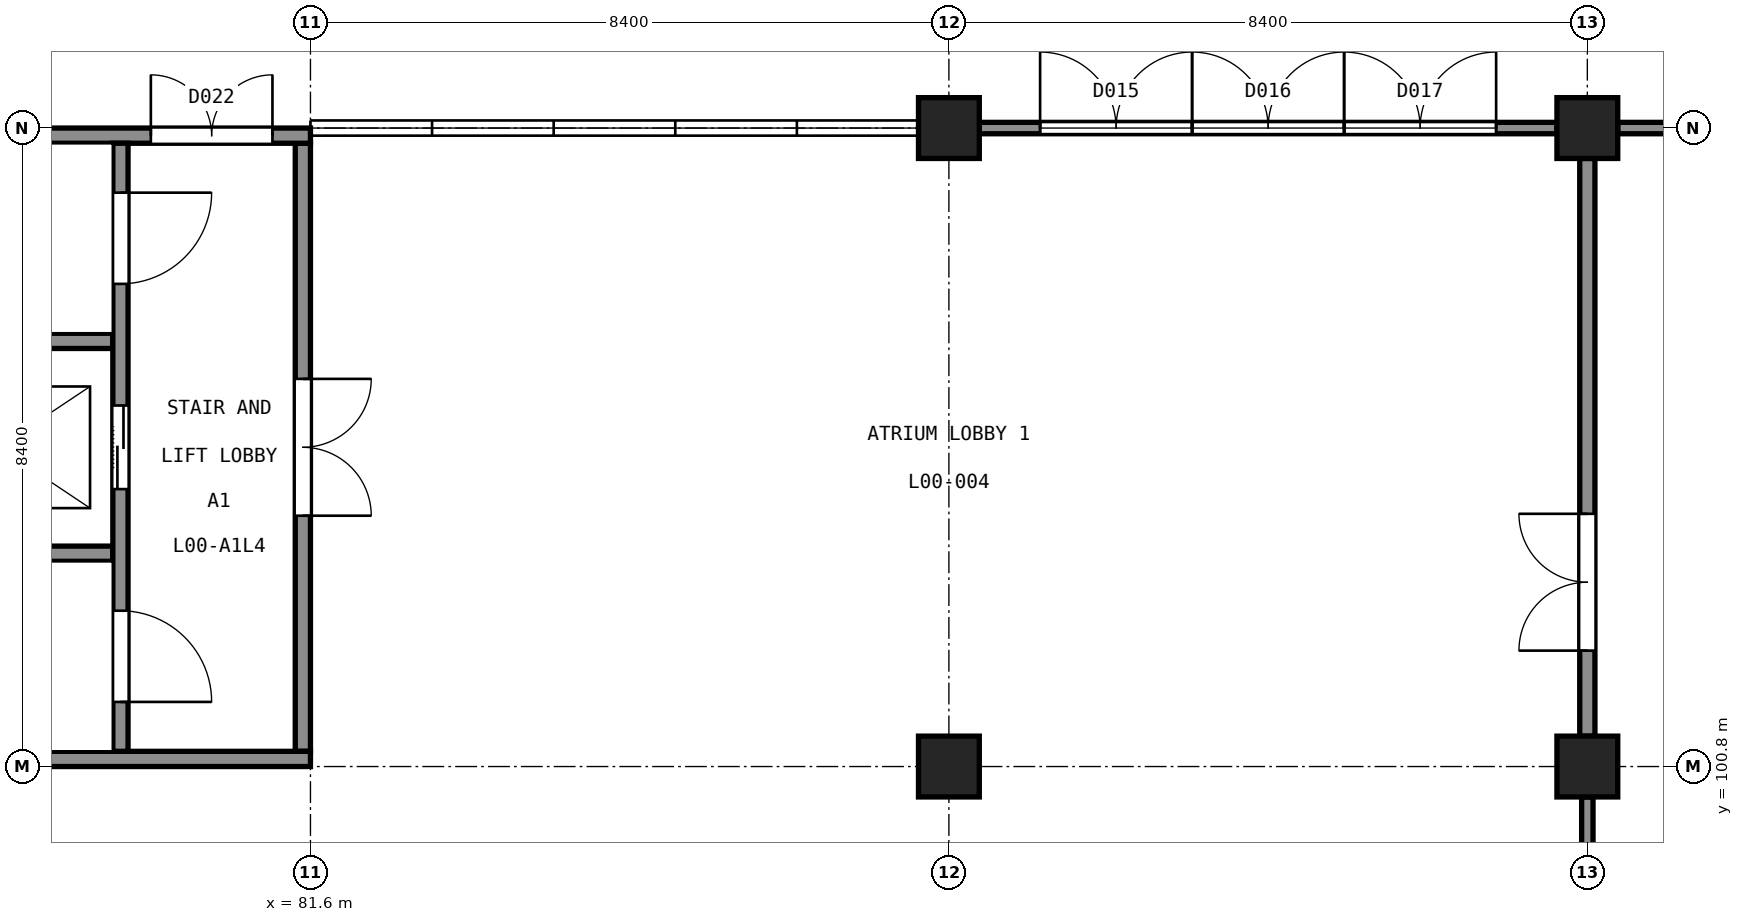
"""IFC4 building model, lengths in metres.
Left out: names, types, materials, properties, quantities, classifications, styles, units other than length and angle.
Written with IfcOpenShell. Run it as: python <this file> out.ifc"""

import sys

from ifc_helpers import new_model, si_unit, direction, frame, frame_2d, origin, origin_2d, place, context, subcontext, project, spatial, rectangle, extrude, element, fill, save


model = new_model("IFC4")
c1 = context("Model", 3, precision=1e-05, world=origin(), true_north=direction((0.0, 1.0)))
c2 = subcontext(c1, "Body", "Model", "MODEL_VIEW")
j1 = project(units=[si_unit("LENGTHUNIT", "METRE"), si_unit("PLANEANGLEUNIT", "RADIAN")], contexts=[c1])
p1 = place(None, origin())
s1 = spatial("IfcSite", under=j1, at=p1, CompositionType="ELEMENT")
p2 = place(p1, origin())
s2 = spatial("IfcBuilding", under=s1, at=p2, CompositionType="ELEMENT")
p3 = place(p2, origin())
s3 = spatial("IfcBuildingStorey", under=s2, at=p3, CompositionType="ELEMENT", Elevation=0.0)
p4 = place(p3, frame((73.2, 100.9, -1.8), z_axis=(0.0, 0.0, 1.0), x_axis=(1.0, 0.0, 0.0)))
e1 = element("IfcWall", 1, at=p4, inside=s3, PredefinedType="SHEAR", context=c2, shape_type="SweptSolid", body=[
    extrude(rectangle(XDim=8.4, YDim=0.2, at=frame_2d((4.2, 0.0))), origin(), (0.0, 0.0, 1.0), 7.3),
])
p5 = place(p3, frame((73.2, 109.1, -1.8), z_axis=(0.0, 0.0, 1.0), x_axis=(1.0, 0.0, 0.0)))
e2 = element("IfcWall", 2, at=p5, inside=s3, PredefinedType="SHEAR", context=c2, shape_type="SweptSolid", body=[
    extrude(rectangle(XDim=8.4, YDim=0.2, at=frame_2d((4.2, 0.0))), origin(), (0.0, 0.0, 1.0), 7.3),
])
p6 = place(p5, frame((6.3, 0.0, 1.8)))
e3 = element("IfcOpeningElement", 3, at=p6, cuts=e2, PredefinedType="OPENING", context=c2, shape_type="SweptSolid", body=[
    extrude(rectangle(XDim=1.6, YDim=2.1, at=frame_2d((0.8, 1.05))), frame((0.0, 0.11, 0.0), z_axis=(0.0, -1.0, 0.0), x_axis=(1.0, 0.0, 0.0)), (0.0, 0.0, 1.0), 0.22),
])
p7 = place(p3, frame((81.5, 101.0, -1.8), z_axis=(0.0, 0.0, 1.0), x_axis=(0.0, 1.0, 0.0)))
e4 = element("IfcWall", 4, at=p7, inside=s3, PredefinedType="SHEAR", context=c2, shape_type="SweptSolid", body=[
    extrude(rectangle(XDim=8.0, YDim=0.2, at=frame_2d((4.0, 0.0))), origin(), (0.0, 0.0, 1.0), 7.3),
])
p8 = place(p7, frame((3.1, 0.0, 1.8)))
e5 = element("IfcOpeningElement", 5, at=p8, cuts=e4, PredefinedType="OPENING", context=c2, shape_type="SweptSolid", body=[
    extrude(rectangle(XDim=1.8, YDim=2.1, at=frame_2d((0.9, 1.05))), frame((0.0, 0.11, 0.0), z_axis=(0.0, -1.0, 0.0), x_axis=(1.0, 0.0, 0.0)), (0.0, 0.0, 1.0), 0.22),
])
p9 = place(p3, frame((79.1, 101.0, -1.8), z_axis=(0.0, 0.0, 1.0), x_axis=(0.0, 1.0, 0.0)))
e6 = element("IfcWall", 6, at=p9, inside=s3, PredefinedType="SHEAR", context=c2, shape_type="SweptSolid", body=[
    extrude(rectangle(XDim=8.0, YDim=0.2, at=frame_2d((4.0, 0.0))), origin(), (0.0, 0.0, 1.0), 7.3),
])
p10 = place(p9, frame((0.65, 0.0, 1.8)))
e7 = element("IfcOpeningElement", 7, at=p10, cuts=e6, PredefinedType="OPENING", context=c2, shape_type="SweptSolid", body=[
    extrude(rectangle(XDim=1.2, YDim=2.1, at=frame_2d((0.6, 1.05))), frame((0.0, 0.11, 0.0), z_axis=(0.0, -1.0, 0.0), x_axis=(1.0, 0.0, 0.0)), (0.0, 0.0, 1.0), 0.22),
])
p11 = place(p9, frame((6.15, 0.0, 1.8)))
e8 = element("IfcOpeningElement", 8, at=p11, cuts=e6, PredefinedType="OPENING", context=c2, shape_type="SweptSolid", body=[
    extrude(rectangle(XDim=1.2, YDim=2.1, at=frame_2d((0.6, 1.05))), frame((0.0, 0.11, 0.0), z_axis=(0.0, -1.0, 0.0), x_axis=(1.0, 0.0, 0.0)), (0.0, 0.0, 1.0), 0.22),
])
p12 = place(p9, frame((3.45, 0.0, 1.8)))
e9 = element("IfcOpeningElement", 9, at=p12, cuts=e6, PredefinedType="OPENING", context=c2, shape_type="SweptSolid", body=[
    extrude(rectangle(XDim=1.1, YDim=2.1, at=frame_2d((0.55, 1.05))), frame((0.0, 0.11, 0.0), z_axis=(0.0, -1.0, 0.0), x_axis=(1.0, 0.0, 0.0)), (0.0, 0.0, 1.0), 0.22),
])
for number, where, z_axis, x_axis in (
    (10, (73.4, 103.6, -1.8), (0.0, 0.0, 1.0), (1.0, 0.0, 0.0)),
    (11, (73.4, 106.4, -1.8), (0.0, 0.0, 1.0), (1.0, 0.0, 0.0)),
):
    element("IfcWall", number, at=place(p3, frame(where, z_axis=z_axis, x_axis=x_axis)), inside=s3, PredefinedType="SHEAR", context=c2, shape_type="SweptSolid", body=[
        extrude(rectangle(XDim=5.6, YDim=0.2, at=frame_2d((2.8, 0.0))), origin(), (0.0, 0.0, 1.0), 7.3),
    ])
for number, where, z_axis, x_axis in (
    (12, (90.0, 100.8, -0.3), (0.0, 0.0, 1.0), (1.0, 0.0, 0.0)),
    (13, (90.0, 109.2, -0.3), (0.0, 0.0, 1.0), (1.0, 0.0, 0.0)),
    (14, (98.4, 100.8, -0.3), (0.0, 0.0, 1.0), (1.0, 0.0, 0.0)),
    (15, (98.4, 109.2, -0.3), (0.0, 0.0, 1.0), (1.0, 0.0, 0.0)),
):
    element("IfcColumn", number, at=place(p3, frame(where, z_axis=z_axis, x_axis=x_axis)), inside=s3, PredefinedType="COLUMN", context=c2, shape_type="SweptSolid", body=[
        extrude(rectangle(XDim=0.8, YDim=0.8, at=origin_2d()), origin(), (0.0, 0.0, 1.0), 5.8),
    ])
p13 = place(p3, frame((98.8, 109.2, 0.0), z_axis=(0.0, 0.0, 1.0), x_axis=(1.0, 0.0, 0.0)))
e16 = element("IfcWall", 16, at=p13, inside=s3, PredefinedType="ELEMENTEDWALL", context=c2, shape_type="SweptSolid", body=[
    extrude(rectangle(XDim=7.6, YDim=0.15, at=frame_2d((3.8, 0.0))), origin(), (0.0, 0.0, 1.0), 4.44),
])
p14 = place(p13, frame((2.0, 0.0, 0.0)))
e17 = element("IfcOpeningElement", 17, at=p14, cuts=e16, PredefinedType="OPENING", context=c2, shape_type="SweptSolid", body=[
    extrude(rectangle(XDim=1.8, YDim=2.4, at=frame_2d((0.9, 1.2))), frame((0.0, 0.085, 0.0), z_axis=(0.0, -1.0, 0.0), x_axis=(1.0, 0.0, 0.0)), (0.0, 0.0, 1.0), 0.17),
])
p15 = place(p13, frame((2.0, 0.0, 2.6)))
e18 = element("IfcOpeningElement", 18, at=p15, cuts=e16, PredefinedType="OPENING", context=c2, shape_type="SweptSolid", body=[
    extrude(rectangle(XDim=1.8, YDim=1.74, at=frame_2d((0.9, 0.87))), frame((0.0, 0.085, 0.0), z_axis=(0.0, -1.0, 0.0), x_axis=(1.0, 0.0, 0.0)), (0.0, 0.0, 1.0), 0.17),
])
p16 = place(p13, frame((3.8, 0.0, 0.0)))
e19 = element("IfcOpeningElement", 19, at=p16, cuts=e16, PredefinedType="OPENING", context=c2, shape_type="SweptSolid", body=[
    extrude(rectangle(XDim=1.8, YDim=2.4, at=frame_2d((0.9, 1.2))), frame((0.0, 0.085, 0.0), z_axis=(0.0, -1.0, 0.0), x_axis=(1.0, 0.0, 0.0)), (0.0, 0.0, 1.0), 0.17),
])
p17 = place(p13, frame((3.8, 0.0, 2.6)))
e20 = element("IfcOpeningElement", 20, at=p17, cuts=e16, PredefinedType="OPENING", context=c2, shape_type="SweptSolid", body=[
    extrude(rectangle(XDim=1.8, YDim=1.74, at=frame_2d((0.9, 0.87))), frame((0.0, 0.085, 0.0), z_axis=(0.0, -1.0, 0.0), x_axis=(1.0, 0.0, 0.0)), (0.0, 0.0, 1.0), 0.17),
])
p18 = place(p3, frame((90.4, 109.2, 0.0), z_axis=(0.0, 0.0, 1.0), x_axis=(1.0, 0.0, 0.0)))
e21 = element("IfcWall", 21, at=p18, inside=s3, PredefinedType="ELEMENTEDWALL", context=c2, shape_type="SweptSolid", body=[
    extrude(rectangle(XDim=7.6, YDim=0.15, at=frame_2d((3.8, 0.0))), origin(), (0.0, 0.0, 1.0), 4.44),
])
p19 = place(p18, frame((0.8, 0.0, 0.0)))
e22 = element("IfcOpeningElement", 22, at=p19, cuts=e21, PredefinedType="OPENING", context=c2, shape_type="SweptSolid", body=[
    extrude(rectangle(XDim=2.0, YDim=2.4, at=frame_2d((1.0, 1.2))), frame((0.0, 0.085, 0.0), z_axis=(0.0, -1.0, 0.0), x_axis=(1.0, 0.0, 0.0)), (0.0, 0.0, 1.0), 0.17),
])
p20 = place(p18, frame((0.8, 0.0, 2.6)))
e23 = element("IfcOpeningElement", 23, at=p20, cuts=e21, PredefinedType="OPENING", context=c2, shape_type="SweptSolid", body=[
    extrude(rectangle(XDim=2.0, YDim=1.74, at=frame_2d((1.0, 0.87))), frame((0.0, 0.085, 0.0), z_axis=(0.0, -1.0, 0.0), x_axis=(1.0, 0.0, 0.0)), (0.0, 0.0, 1.0), 0.17),
])
p21 = place(p18, frame((2.8, 0.0, 0.0)))
e24 = element("IfcOpeningElement", 24, at=p21, cuts=e21, PredefinedType="OPENING", context=c2, shape_type="SweptSolid", body=[
    extrude(rectangle(XDim=2.0, YDim=2.4, at=frame_2d((1.0, 1.2))), frame((0.0, 0.085, 0.0), z_axis=(0.0, -1.0, 0.0), x_axis=(1.0, 0.0, 0.0)), (0.0, 0.0, 1.0), 0.17),
])
p22 = place(p18, frame((2.8, 0.0, 2.6)))
e25 = element("IfcOpeningElement", 25, at=p22, cuts=e21, PredefinedType="OPENING", context=c2, shape_type="SweptSolid", body=[
    extrude(rectangle(XDim=2.0, YDim=1.74, at=frame_2d((1.0, 0.87))), frame((0.0, 0.085, 0.0), z_axis=(0.0, -1.0, 0.0), x_axis=(1.0, 0.0, 0.0)), (0.0, 0.0, 1.0), 0.17),
])
p23 = place(p18, frame((4.8, 0.0, 0.0)))
e26 = element("IfcOpeningElement", 26, at=p23, cuts=e21, PredefinedType="OPENING", context=c2, shape_type="SweptSolid", body=[
    extrude(rectangle(XDim=2.0, YDim=2.4, at=frame_2d((1.0, 1.2))), frame((0.0, 0.085, 0.0), z_axis=(0.0, -1.0, 0.0), x_axis=(1.0, 0.0, 0.0)), (0.0, 0.0, 1.0), 0.17),
])
p24 = place(p18, frame((4.8, 0.0, 2.6)))
e27 = element("IfcOpeningElement", 27, at=p24, cuts=e21, PredefinedType="OPENING", context=c2, shape_type="SweptSolid", body=[
    extrude(rectangle(XDim=2.0, YDim=1.74, at=frame_2d((1.0, 0.87))), frame((0.0, 0.085, 0.0), z_axis=(0.0, -1.0, 0.0), x_axis=(1.0, 0.0, 0.0)), (0.0, 0.0, 1.0), 0.17),
])
p25 = place(p3, frame((98.4, 101.2, 0.0), z_axis=(0.0, 0.0, 1.0), x_axis=(0.0, 1.0, 0.0)))
e28 = element("IfcWall", 28, at=p25, inside=s3, PredefinedType="PARTITIONING", context=c2, shape_type="SweptSolid", body=[
    extrude(rectangle(XDim=7.6, YDim=0.2, at=frame_2d((3.8, 0.0))), origin(), (0.0, 0.0, 1.0), 4.4),
])
p26 = place(p25, frame((1.125, 0.0, 0.0)))
e29 = element("IfcOpeningElement", 29, at=p26, cuts=e28, PredefinedType="OPENING", context=c2, shape_type="SweptSolid", body=[
    extrude(rectangle(XDim=1.8, YDim=2.1, at=frame_2d((0.9, 1.05))), frame((0.0, 0.11, 0.0), z_axis=(0.0, -1.0, 0.0), x_axis=(1.0, 0.0, 0.0)), (0.0, 0.0, 1.0), 0.22),
])
p27 = place(p3, frame((98.4, 92.8, 0.0), z_axis=(0.0, 0.0, 1.0), x_axis=(0.0, 1.0, 0.0)))
e30 = element("IfcWall", 30, at=p27, inside=s3, PredefinedType="PARTITIONING", context=c2, shape_type="SweptSolid", body=[
    extrude(rectangle(XDim=7.6, YDim=0.15, at=frame_2d((3.8, 0.0))), origin(), (0.0, 0.0, 1.0), 4.4),
])
p28 = place(p19, origin())
e31 = element("IfcDoor", 31, at=p28, inside=s3, OperationType="DOUBLE_DOOR_SINGLE_SWING", PredefinedType="DOOR", context=c2, shape_type="SweptSolid", body=[
    extrude(rectangle(XDim=2.0, YDim=2.4, at=frame_2d((1.0, 1.2))), frame((0.0, 0.025, 0.0), z_axis=(0.0, -1.0, 0.0), x_axis=(1.0, 0.0, 0.0)), (0.0, 0.0, 1.0), 0.05),
])
fill(e22, e31)
p29 = place(p20, origin())
e32 = element("IfcWindow", 32, at=p29, inside=s3, PartitioningType="SINGLE_PANEL", PredefinedType="WINDOW", context=c2, shape_type="SweptSolid", body=[
    extrude(rectangle(XDim=2.0, YDim=1.74, at=frame_2d((1.0, 0.87))), frame((0.0, 0.03, 0.0), z_axis=(0.0, -1.0, 0.0), x_axis=(1.0, 0.0, 0.0)), (0.0, 0.0, 1.0), 0.06),
])
fill(e23, e32)
p30 = place(p21, origin())
e33 = element("IfcDoor", 33, at=p30, inside=s3, OperationType="DOUBLE_DOOR_SINGLE_SWING", PredefinedType="DOOR", context=c2, shape_type="SweptSolid", body=[
    extrude(rectangle(XDim=2.0, YDim=2.4, at=frame_2d((1.0, 1.2))), frame((0.0, 0.025, 0.0), z_axis=(0.0, -1.0, 0.0), x_axis=(1.0, 0.0, 0.0)), (0.0, 0.0, 1.0), 0.05),
])
fill(e24, e33)
p31 = place(p22, origin())
e34 = element("IfcWindow", 34, at=p31, inside=s3, PartitioningType="SINGLE_PANEL", PredefinedType="WINDOW", context=c2, shape_type="SweptSolid", body=[
    extrude(rectangle(XDim=2.0, YDim=1.74, at=frame_2d((1.0, 0.87))), frame((0.0, 0.03, 0.0), z_axis=(0.0, -1.0, 0.0), x_axis=(1.0, 0.0, 0.0)), (0.0, 0.0, 1.0), 0.06),
])
fill(e25, e34)
p32 = place(p23, origin())
e35 = element("IfcDoor", 35, at=p32, inside=s3, OperationType="DOUBLE_DOOR_SINGLE_SWING", PredefinedType="DOOR", context=c2, shape_type="SweptSolid", body=[
    extrude(rectangle(XDim=2.0, YDim=2.4, at=frame_2d((1.0, 1.2))), frame((0.0, 0.025, 0.0), z_axis=(0.0, -1.0, 0.0), x_axis=(1.0, 0.0, 0.0)), (0.0, 0.0, 1.0), 0.05),
])
fill(e26, e35)
p33 = place(p24, origin())
e36 = element("IfcWindow", 36, at=p33, inside=s3, PartitioningType="SINGLE_PANEL", PredefinedType="WINDOW", context=c2, shape_type="SweptSolid", body=[
    extrude(rectangle(XDim=2.0, YDim=1.74, at=frame_2d((1.0, 0.87))), frame((0.0, 0.03, 0.0), z_axis=(0.0, -1.0, 0.0), x_axis=(1.0, 0.0, 0.0)), (0.0, 0.0, 1.0), 0.06),
])
fill(e27, e36)
p34 = place(p6, origin())
e37 = element("IfcDoor", 37, at=p34, inside=s3, OperationType="DOUBLE_DOOR_SINGLE_SWING", PredefinedType="DOOR", context=c2, shape_type="SweptSolid", body=[
    extrude(rectangle(XDim=1.6, YDim=2.1, at=frame_2d((0.8, 1.05))), frame((0.0, 0.025, 0.0), z_axis=(0.0, -1.0, 0.0), x_axis=(1.0, 0.0, 0.0)), (0.0, 0.0, 1.0), 0.05),
])
fill(e3, e37)
p35 = place(p26, origin())
e38 = element("IfcDoor", 38, at=p35, inside=s3, OperationType="DOUBLE_DOOR_SINGLE_SWING", PredefinedType="DOOR", context=c2, shape_type="SweptSolid", body=[
    extrude(rectangle(XDim=1.8, YDim=2.1, at=frame_2d((0.9, 1.05))), frame((0.0, 0.025, 0.0), z_axis=(0.0, -1.0, 0.0), x_axis=(1.0, 0.0, 0.0)), (0.0, 0.0, 1.0), 0.05),
])
fill(e29, e38)
p36 = place(p8, origin())
e39 = element("IfcDoor", 39, at=p36, inside=s3, OperationType="DOUBLE_DOOR_SINGLE_SWING", PredefinedType="DOOR", context=c2, shape_type="SweptSolid", body=[
    extrude(rectangle(XDim=1.8, YDim=2.1, at=frame_2d((0.9, 1.05))), frame((0.0, 0.025, 0.0), z_axis=(0.0, -1.0, 0.0), x_axis=(1.0, 0.0, 0.0)), (0.0, 0.0, 1.0), 0.05),
])
fill(e5, e39)
p37 = place(p10, origin())
e40 = element("IfcDoor", 40, at=p37, inside=s3, OperationType="SINGLE_SWING_LEFT", PredefinedType="DOOR", context=c2, shape_type="SweptSolid", body=[
    extrude(rectangle(XDim=1.2, YDim=2.1, at=frame_2d((0.6, 1.05))), frame((0.0, 0.025, 0.0), z_axis=(0.0, -1.0, 0.0), x_axis=(1.0, 0.0, 0.0)), (0.0, 0.0, 1.0), 0.05),
])
fill(e7, e40)
p38 = place(p11, origin())
e41 = element("IfcDoor", 41, at=p38, inside=s3, OperationType="SINGLE_SWING_RIGHT", PredefinedType="DOOR", context=c2, shape_type="SweptSolid", body=[
    extrude(rectangle(XDim=1.2, YDim=2.1, at=frame_2d((0.6, 1.05))), frame((0.0, 0.025, 0.0), z_axis=(0.0, -1.0, 0.0), x_axis=(1.0, 0.0, 0.0)), (0.0, 0.0, 1.0), 0.05),
])
fill(e8, e41)
p39 = place(p12, origin())
e42 = element("IfcDoor", 42, at=p39, inside=s3, OperationType="DOUBLE_DOOR_SLIDING", PredefinedType="DOOR", context=c2, shape_type="SweptSolid", body=[
    extrude(rectangle(XDim=1.1, YDim=2.1, at=frame_2d((0.55, 1.05))), frame((0.0, 0.025, 0.0), z_axis=(0.0, -1.0, 0.0), x_axis=(1.0, 0.0, 0.0)), (0.0, 0.0, 1.0), 0.05),
])
fill(e9, e42)
save(model, sys.argv[1])
